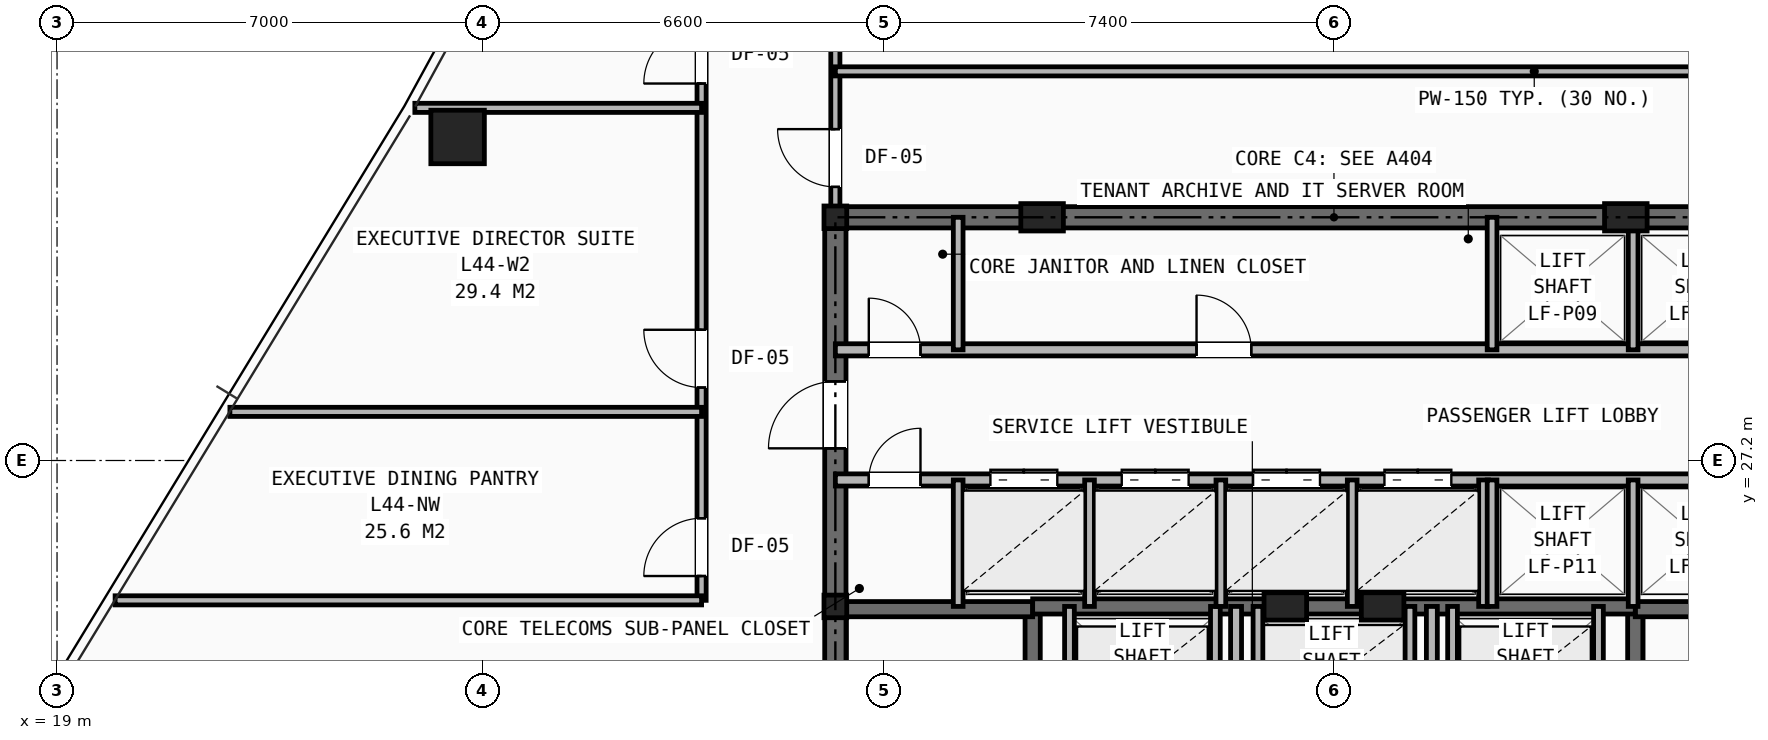
"""IFC4 building model, lengths in metres.
Left out: names, types, materials, properties, quantities, classifications, styles, units other than length and angle.
Written with IfcOpenShell. Run it as: python <this file> out.ifc"""

import sys

from ifc_helpers import new_model, si_unit, direction, frame, frame_2d, origin, origin_2d, place, context, subcontext, project, spatial, rectangle, hollow_rectangle, i_section, extrude, element, fill, save


model = new_model("IFC4")
c1 = context("Model", 3, precision=1e-05, world=origin(), true_north=direction((0.0, 1.0)))
c2 = subcontext(c1, "Body", "Model", "MODEL_VIEW")
j1 = project(units=[si_unit("LENGTHUNIT", "METRE"), si_unit("PLANEANGLEUNIT", "RADIAN")], contexts=[c1])
p1 = place(None, origin())
s1 = spatial("IfcSite", under=j1, at=p1, CompositionType="ELEMENT")
p2 = place(p1, origin())
s2 = spatial("IfcBuilding", under=s1, at=p2, CompositionType="ELEMENT")
p3 = place(p2, frame((0.0, 0.0, 153.95)))
s3 = spatial("IfcBuildingStorey", under=s2, at=p3, CompositionType="ELEMENT", Elevation=153.95)
for number, where, z_axis, x_axis in (
    (1, (31.8, 24.8, 0.0), (0.0, 0.0, 1.0), (1.0, 0.0, 0.0)),
    (2, (31.8, 31.2, 0.0), (0.0, 0.0, 1.0), (1.0, 0.0, 0.0)),
):
    element("IfcColumn", number, at=place(p3, frame(where, z_axis=z_axis, x_axis=x_axis)), inside=s3, PredefinedType="COLUMN", context=c2, shape_type="SweptSolid", body=[
        extrude(i_section(OverallWidth=0.374, OverallDepth=0.372, WebThickness=0.016, FlangeThickness=0.026, at=origin_2d()), origin(), (0.0, 0.0, 1.0), 3.45),
    ])
for number, where, z_axis, x_axis in (
    (3, (35.2, 31.2, 0.0), (0.0, 0.0, 1.0), (1.0, 0.0, 0.0)),
    (4, (44.8, 31.2, 0.0), (0.0, 0.0, 1.0), (1.0, 0.0, 0.0)),
    (5, (39.2, 24.8, 0.0), (0.0, 0.0, 1.0), (1.0, 0.0, 0.0)),
    (6, (40.8, 24.8, 0.0), (0.0, 0.0, 1.0), (1.0, 0.0, 0.0)),
):
    element("IfcColumn", number, at=place(p3, frame(where, z_axis=z_axis, x_axis=x_axis)), inside=s3, PredefinedType="PILASTER", context=c2, shape_type="SweptSolid", body=[
        extrude(rectangle(XDim=0.7, YDim=0.45, at=origin_2d()), origin(), (0.0, 0.0, 1.0), 3.45),
    ])
p4 = place(p3, frame((25.588, 32.521, 0.0), z_axis=(0.0, 0.0, 1.0), x_axis=(1.0, 0.0, 0.0)))
e7 = element("IfcColumn", 7, at=p4, inside=s3, PredefinedType="COLUMN", context=c2, shape_type="SweptSolid", body=[
    extrude(hollow_rectangle(XDim=0.88, YDim=0.88, WallThickness=0.06, at=origin_2d()), origin(), (0.0, 0.0, 1.0), 3.45),
])
p5 = place(p3, frame((31.8, 31.2, 0.0), z_axis=(0.0, 0.0, 1.0), x_axis=(1.0, 0.0, 0.0)))
e8 = element("IfcWall", 8, at=p5, inside=s3, PredefinedType="SHEAR", context=c2, shape_type="SweptSolid", body=[
    extrude(rectangle(XDim=16.4, YDim=0.35, at=frame_2d((8.2, 0.0))), origin(), (0.0, 0.0, 1.0), 3.15),
])
p6 = place(p3, frame((31.8, 16.4, 0.0), z_axis=(0.0, 0.0, 1.0), x_axis=(0.0, 1.0, 0.0)))
e9 = element("IfcWall", 9, at=p6, inside=s3, PredefinedType="SHEAR", context=c2, shape_type="SweptSolid", body=[
    extrude(rectangle(XDim=14.8, YDim=0.35, at=frame_2d((7.4, 0.0))), origin(), (0.0, 0.0, 1.0), 3.15),
])
p7 = place(p6, frame((11.0, 0.0, 0.0)))
e10 = element("IfcOpeningElement", 10, at=p7, cuts=e9, PredefinedType="OPENING", context=c2, shape_type="SweptSolid", body=[
    extrude(rectangle(XDim=1.1, YDim=2.15, at=frame_2d((0.55, 1.075))), frame((0.0, 0.185, 0.0), z_axis=(0.0, -1.0, 0.0), x_axis=(1.0, 0.0, 0.0)), (0.0, 0.0, 1.0), 0.37),
])
p8 = place(p3, frame((35.045, 16.4, 0.0), z_axis=(0.0, 0.0, 1.0), x_axis=(0.0, 1.0, 0.0)))
e11 = element("IfcWall", 11, at=p8, inside=s3, PredefinedType="SHEAR", context=c2, shape_type="SweptSolid", body=[
    extrude(rectangle(XDim=8.4, YDim=0.25, at=frame_2d((4.2, 0.0))), origin(), (0.0, 0.0, 1.0), 3.15),
])
p9 = place(p8, frame((0.45, 0.0, 0.0)))
e12 = element("IfcOpeningElement", 12, at=p9, cuts=e11, PredefinedType="OPENING", context=c2, shape_type="SweptSolid", body=[
    extrude(rectangle(XDim=0.95, YDim=2.1, at=frame_2d((0.475, 1.05))), frame((0.0, 0.135, 0.0), z_axis=(0.0, -1.0, 0.0), x_axis=(1.0, 0.0, 0.0)), (0.0, 0.0, 1.0), 0.27),
])
p10 = place(p3, frame((31.8, 24.755, 0.0), z_axis=(0.0, 0.0, 1.0), x_axis=(1.0, 0.0, 0.0)))
e13 = element("IfcWall", 13, at=p10, inside=s3, PredefinedType="SHEAR", context=c2, shape_type="SweptSolid", body=[
    extrude(rectangle(XDim=3.245, YDim=0.25, at=frame_2d((1.623, 0.0))), origin(), (0.0, 0.0, 1.0), 3.15),
])
p11 = place(p3, frame((44.955, 16.4, 0.0), z_axis=(0.0, 0.0, 1.0), x_axis=(0.0, 1.0, 0.0)))
e14 = element("IfcWall", 14, at=p11, inside=s3, PredefinedType="SHEAR", context=c2, shape_type="SweptSolid", body=[
    extrude(rectangle(XDim=8.4, YDim=0.25, at=frame_2d((4.2, 0.0))), origin(), (0.0, 0.0, 1.0), 3.15),
])
p12 = place(p11, frame((0.45, 0.0, 0.0)))
e15 = element("IfcOpeningElement", 15, at=p12, cuts=e14, PredefinedType="OPENING", context=c2, shape_type="SweptSolid", body=[
    extrude(rectangle(XDim=0.95, YDim=2.1, at=frame_2d((0.475, 1.05))), frame((0.0, 0.135, 0.0), z_axis=(0.0, -1.0, 0.0), x_axis=(1.0, 0.0, 0.0)), (0.0, 0.0, 1.0), 0.27),
])
p13 = place(p3, frame((44.955, 24.755, 0.0), z_axis=(0.0, 0.0, 1.0), x_axis=(1.0, 0.0, 0.0)))
e16 = element("IfcWall", 16, at=p13, inside=s3, PredefinedType="SHEAR", context=c2, shape_type="SweptSolid", body=[
    extrude(rectangle(XDim=3.245, YDim=0.25, at=frame_2d((1.623, 0.0))), origin(), (0.0, 0.0, 1.0), 3.15),
])
p14 = place(p3, frame((35.045, 24.8, 0.0), z_axis=(0.0, 0.0, 1.0), x_axis=(1.0, 0.0, 0.0)))
e17 = element("IfcWall", 17, at=p14, inside=s3, PredefinedType="SHEAR", context=c2, shape_type="SweptSolid", body=[
    extrude(rectangle(XDim=9.91, YDim=0.25, at=frame_2d((4.955, 0.0))), origin(), (0.0, 0.0, 1.0), 3.15),
])
p15 = place(p3, frame((38.39, 16.4, 0.0), z_axis=(0.0, 0.0, 1.0), x_axis=(0.0, 1.0, 0.0)))
e18 = element("IfcWall", 18, at=p15, inside=s3, PredefinedType="PARTITIONING", context=c2, shape_type="SweptSolid", body=[
    extrude(rectangle(XDim=8.4, YDim=0.18, at=frame_2d((4.2, 0.0))), origin(), (0.0, 0.0, 1.0), 2.601),
])
p16 = place(p15, frame((4.45, 0.0, 0.0)))
e19 = element("IfcOpeningElement", 19, at=p16, cuts=e18, PredefinedType="OPENING", context=c2, shape_type="SweptSolid", body=[
    extrude(rectangle(XDim=0.95, YDim=2.1, at=frame_2d((0.475, 1.05))), frame((0.0, 0.1, 0.0), z_axis=(0.0, -1.0, 0.0), x_axis=(1.0, 0.0, 0.0)), (0.0, 0.0, 1.0), 0.2),
])
p17 = place(p3, frame((41.61, 16.4, 0.0), z_axis=(0.0, 0.0, 1.0), x_axis=(0.0, 1.0, 0.0)))
e20 = element("IfcWall", 20, at=p17, inside=s3, PredefinedType="PARTITIONING", context=c2, shape_type="SweptSolid", body=[
    extrude(rectangle(XDim=8.4, YDim=0.18, at=frame_2d((4.2, 0.0))), origin(), (0.0, 0.0, 1.0), 2.601),
])
p18 = place(p17, frame((2.5, 0.0, 0.0)))
e21 = element("IfcOpeningElement", 21, at=p18, cuts=e20, PredefinedType="OPENING", context=c2, shape_type="SweptSolid", body=[
    extrude(rectangle(XDim=0.85, YDim=2.05, at=frame_2d((0.425, 1.025))), frame((0.0, 0.1, 0.0), z_axis=(0.0, -1.0, 0.0), x_axis=(1.0, 0.0, 0.0)), (0.0, 0.0, 1.0), 0.2),
])
for number, where, z_axis, x_axis in (
    (22, (35.65, 22.48, 0.0), (0.0, 0.0, 1.0), (0.0, 1.0, 0.0)),
    (23, (38.05, 22.48, 0.0), (0.0, 0.0, 1.0), (0.0, 1.0, 0.0)),
    (24, (41.95, 22.48, 0.0), (0.0, 0.0, 1.0), (0.0, 1.0, 0.0)),
    (25, (44.35, 22.48, 0.0), (0.0, 0.0, 1.0), (0.0, 1.0, 0.0)),
    (26, (38.75, 22.48, 0.0), (0.0, 0.0, 1.0), (0.0, 1.0, 0.0)),
    (27, (41.25, 22.48, 0.0), (0.0, 0.0, 1.0), (0.0, 1.0, 0.0)),
):
    element("IfcWall", number, at=place(p3, frame(where, z_axis=z_axis, x_axis=x_axis)), inside=s3, PredefinedType="SOLIDWALL", context=c2, shape_type="SweptSolid", body=[
        extrude(rectangle(XDim=2.32, YDim=0.16, at=frame_2d((1.16, 0.0))), origin(), (0.0, 0.0, 1.0), 3.15),
    ])
p19 = place(p3, frame((31.8, 29.02, 0.0), z_axis=(0.0, 0.0, 1.0), x_axis=(1.0, 0.0, 0.0)))
e28 = element("IfcWall", 28, at=p19, inside=s3, PredefinedType="SOLIDWALL", context=c2, shape_type="SweptSolid", body=[
    extrude(rectangle(XDim=16.4, YDim=0.2, at=frame_2d((8.2, 0.0))), origin(), (0.0, 0.0, 1.0), 2.601),
])
p20 = place(p19, frame((0.55, 0.0, 0.0)))
e29 = element("IfcOpeningElement", 29, at=p20, cuts=e28, PredefinedType="OPENING", context=c2, shape_type="SweptSolid", body=[
    extrude(rectangle(XDim=0.85, YDim=2.05, at=frame_2d((0.425, 1.025))), frame((0.0, 0.11, 0.0), z_axis=(0.0, -1.0, 0.0), x_axis=(1.0, 0.0, 0.0)), (0.0, 0.0, 1.0), 0.22),
])
p21 = place(p19, frame((5.94, 0.0, 0.0)))
e30 = element("IfcOpeningElement", 30, at=p21, cuts=e28, PredefinedType="OPENING", context=c2, shape_type="SweptSolid", body=[
    extrude(rectangle(XDim=0.9, YDim=2.1, at=frame_2d((0.45, 1.05))), frame((0.0, 0.11, 0.0), z_axis=(0.0, -1.0, 0.0), x_axis=(1.0, 0.0, 0.0)), (0.0, 0.0, 1.0), 0.22),
])
p22 = place(p3, frame((31.8, 26.88, 0.0), z_axis=(0.0, 0.0, 1.0), x_axis=(1.0, 0.0, 0.0)))
e31 = element("IfcWall", 31, at=p22, inside=s3, PredefinedType="SOLIDWALL", context=c2, shape_type="SweptSolid", body=[
    extrude(rectangle(XDim=16.4, YDim=0.2, at=frame_2d((8.2, 0.0))), origin(), (0.0, 0.0, 1.0), 2.601),
])
p23 = place(p22, frame((0.55, 0.0, 0.0)))
e32 = element("IfcOpeningElement", 32, at=p23, cuts=e31, PredefinedType="OPENING", context=c2, shape_type="SweptSolid", body=[
    extrude(rectangle(XDim=0.85, YDim=2.05, at=frame_2d((0.425, 1.025))), frame((0.0, 0.11, 0.0), z_axis=(0.0, -1.0, 0.0), x_axis=(1.0, 0.0, 0.0)), (0.0, 0.0, 1.0), 0.22),
])
p24 = place(p22, frame((2.55, 0.0, 0.0)))
e33 = element("IfcOpeningElement", 33, at=p24, cuts=e31, PredefinedType="OPENING", context=c2, shape_type="SweptSolid", body=[
    extrude(rectangle(XDim=1.1, YDim=2.15, at=frame_2d((0.55, 1.075))), frame((0.0, 0.11, 0.0), z_axis=(0.0, -1.0, 0.0), x_axis=(1.0, 0.0, 0.0)), (0.0, 0.0, 1.0), 0.22),
])
p25 = place(p22, frame((4.71, 0.0, 0.0)))
e34 = element("IfcOpeningElement", 34, at=p25, cuts=e31, PredefinedType="OPENING", context=c2, shape_type="SweptSolid", body=[
    extrude(rectangle(XDim=1.1, YDim=2.15, at=frame_2d((0.55, 1.075))), frame((0.0, 0.11, 0.0), z_axis=(0.0, -1.0, 0.0), x_axis=(1.0, 0.0, 0.0)), (0.0, 0.0, 1.0), 0.22),
])
p26 = place(p22, frame((6.87, 0.0, 0.0)))
e35 = element("IfcOpeningElement", 35, at=p26, cuts=e31, PredefinedType="OPENING", context=c2, shape_type="SweptSolid", body=[
    extrude(rectangle(XDim=1.1, YDim=2.15, at=frame_2d((0.55, 1.075))), frame((0.0, 0.11, 0.0), z_axis=(0.0, -1.0, 0.0), x_axis=(1.0, 0.0, 0.0)), (0.0, 0.0, 1.0), 0.22),
])
p27 = place(p22, frame((9.03, 0.0, 0.0)))
e36 = element("IfcOpeningElement", 36, at=p27, cuts=e31, PredefinedType="OPENING", context=c2, shape_type="SweptSolid", body=[
    extrude(rectangle(XDim=1.1, YDim=2.15, at=frame_2d((0.55, 1.075))), frame((0.0, 0.11, 0.0), z_axis=(0.0, -1.0, 0.0), x_axis=(1.0, 0.0, 0.0)), (0.0, 0.0, 1.0), 0.22),
])
p28 = place(p3, frame((33.82, 29.02, 0.0), z_axis=(0.0, 0.0, 1.0), x_axis=(0.0, 1.0, 0.0)))
e37 = element("IfcWall", 37, at=p28, inside=s3, PredefinedType="SOLIDWALL", context=c2, shape_type="SweptSolid", body=[
    extrude(rectangle(XDim=2.18, YDim=0.16, at=frame_2d((1.09, 0.0))), origin(), (0.0, 0.0, 1.0), 2.601),
])
for number, where, z_axis, x_axis in (
    (38, (33.82, 24.8, 0.0), (0.0, 0.0, 1.0), (0.0, 1.0, 0.0)),
    (39, (35.98, 24.8, 0.0), (0.0, 0.0, 1.0), (0.0, 1.0, 0.0)),
    (40, (38.14, 24.8, 0.0), (0.0, 0.0, 1.0), (0.0, 1.0, 0.0)),
    (41, (40.3, 24.8, 0.0), (0.0, 0.0, 1.0), (0.0, 1.0, 0.0)),
    (42, (42.46, 24.8, 0.0), (0.0, 0.0, 1.0), (0.0, 1.0, 0.0)),
):
    element("IfcWall", number, at=place(p3, frame(where, z_axis=z_axis, x_axis=x_axis)), inside=s3, PredefinedType="SOLIDWALL", context=c2, shape_type="SweptSolid", body=[
        extrude(rectangle(XDim=2.08, YDim=0.16, at=frame_2d((1.04, 0.0))), origin(), (0.0, 0.0, 1.0), 3.15),
    ])
for number, where, z_axis, x_axis in (
    (43, (42.6, 29.02, 0.0), (0.0, 0.0, 1.0), (0.0, 1.0, 0.0)),
    (44, (44.92, 29.02, 0.0), (0.0, 0.0, 1.0), (0.0, 1.0, 0.0)),
):
    element("IfcWall", number, at=place(p3, frame(where, z_axis=z_axis, x_axis=x_axis)), inside=s3, PredefinedType="SOLIDWALL", context=c2, shape_type="SweptSolid", body=[
        extrude(rectangle(XDim=2.18, YDim=0.16, at=frame_2d((1.09, 0.0))), origin(), (0.0, 0.0, 1.0), 2.601),
    ])
for number, where, z_axis, x_axis in (
    (45, (42.6, 24.8, 0.0), (0.0, 0.0, 1.0), (0.0, 1.0, 0.0)),
    (46, (44.92, 24.8, 0.0), (0.0, 0.0, 1.0), (0.0, 1.0, 0.0)),
):
    element("IfcWall", number, at=place(p3, frame(where, z_axis=z_axis, x_axis=x_axis)), inside=s3, PredefinedType="SOLIDWALL", context=c2, shape_type="SweptSolid", body=[
        extrude(rectangle(XDim=2.08, YDim=0.16, at=frame_2d((1.04, 0.0))), origin(), (0.0, 0.0, 1.0), 3.15),
    ])
p29 = place(p3, frame((29.6, 24.9, 0.0), z_axis=(0.0, 0.0, 1.0), x_axis=(0.0, 1.0, 0.0)))
e47 = element("IfcWall", 47, at=p29, inside=s3, PredefinedType="PARTITIONING", context=c2, shape_type="SweptSolid", body=[
    extrude(rectangle(XDim=13.9, YDim=0.15, at=frame_2d((6.95, 0.0))), origin(), (0.0, 0.0, 1.0), 2.165),
])
p30 = place(p29, frame((0.4, 0.0, 0.0)))
e48 = element("IfcOpeningElement", 48, at=p30, cuts=e47, PredefinedType="OPENING", context=c2, shape_type="SweptSolid", body=[
    extrude(rectangle(XDim=0.95, YDim=2.1, at=frame_2d((0.475, 1.05))), frame((0.0, 0.085, 0.0), z_axis=(0.0, -1.0, 0.0), x_axis=(1.0, 0.0, 0.0)), (0.0, 0.0, 1.0), 0.17),
])
p31 = place(p29, frame((3.5, 0.0, 0.0)))
e49 = element("IfcOpeningElement", 49, at=p31, cuts=e47, PredefinedType="OPENING", context=c2, shape_type="SweptSolid", body=[
    extrude(rectangle(XDim=0.95, YDim=2.1, at=frame_2d((0.475, 1.05))), frame((0.0, 0.085, 0.0), z_axis=(0.0, -1.0, 0.0), x_axis=(1.0, 0.0, 0.0)), (0.0, 0.0, 1.0), 0.17),
])
p32 = place(p29, frame((8.5, 0.0, 0.0)))
e50 = element("IfcOpeningElement", 50, at=p32, cuts=e47, PredefinedType="OPENING", context=c2, shape_type="SweptSolid", body=[
    extrude(rectangle(XDim=0.95, YDim=2.1, at=frame_2d((0.475, 1.05))), frame((0.0, 0.085, 0.0), z_axis=(0.0, -1.0, 0.0), x_axis=(1.0, 0.0, 0.0)), (0.0, 0.0, 1.0), 0.17),
])
p33 = place(p3, frame((31.8, 31.2, 0.0), z_axis=(0.0, 0.0, 1.0), x_axis=(0.0, 1.0, 0.0)))
e51 = element("IfcWall", 51, at=p33, inside=s3, PredefinedType="PARTITIONING", context=c2, shape_type="SweptSolid", body=[
    extrude(rectangle(XDim=5.3, YDim=0.15, at=frame_2d((2.65, 0.0))), origin(), (0.0, 0.0, 1.0), 2.165),
])
p34 = place(p33, frame((0.5, 0.0, 0.0)))
e52 = element("IfcOpeningElement", 52, at=p34, cuts=e51, PredefinedType="OPENING", context=c2, shape_type="SweptSolid", body=[
    extrude(rectangle(XDim=0.95, YDim=2.1, at=frame_2d((0.475, 1.05))), frame((0.0, 0.085, 0.0), z_axis=(0.0, -1.0, 0.0), x_axis=(1.0, 0.0, 0.0)), (0.0, 0.0, 1.0), 0.17),
])
p35 = place(p33, frame((2.9, 0.0, 0.0)))
e53 = element("IfcOpeningElement", 53, at=p35, cuts=e51, PredefinedType="OPENING", context=c2, shape_type="SweptSolid", body=[
    extrude(rectangle(XDim=0.95, YDim=2.1, at=frame_2d((0.475, 1.05))), frame((0.0, 0.085, 0.0), z_axis=(0.0, -1.0, 0.0), x_axis=(1.0, 0.0, 0.0)), (0.0, 0.0, 1.0), 0.17),
])
p36 = place(p3, frame((19.955, 24.9, 0.0), z_axis=(0.0, 0.0, 1.0), x_axis=(1.0, 0.0, 0.0)))
e54 = element("IfcWall", 54, at=p36, inside=s3, PredefinedType="PARTITIONING", context=c2, shape_type="SweptSolid", body=[
    extrude(rectangle(XDim=9.645, YDim=0.15, at=frame_2d((4.823, 0.0))), origin(), (0.0, 0.0, 1.0), 2.529),
])
p37 = place(p3, frame((21.843, 28.0, 0.0), z_axis=(0.0, 0.0, 1.0), x_axis=(1.0, 0.0, 0.0)))
e55 = element("IfcWall", 55, at=p37, inside=s3, PredefinedType="PARTITIONING", context=c2, shape_type="SweptSolid", body=[
    extrude(rectangle(XDim=7.757, YDim=0.15, at=frame_2d((3.878, 0.0))), origin(), (0.0, 0.0, 1.0), 2.529),
])
p38 = place(p3, frame((24.885, 33.0, 0.0), z_axis=(0.0, 0.0, 1.0), x_axis=(1.0, 0.0, 0.0)))
e56 = element("IfcWall", 56, at=p38, inside=s3, PredefinedType="PARTITIONING", context=c2, shape_type="SweptSolid", body=[
    extrude(rectangle(XDim=4.716, YDim=0.15, at=frame_2d((2.358, 0.0))), origin(), (0.0, 0.0, 1.0), 2.529),
])
p39 = place(p3, frame((31.8, 33.6, 0.0), z_axis=(0.0, 0.0, 1.0), x_axis=(1.0, 0.0, 0.0)))
e57 = element("IfcWall", 57, at=p39, inside=s3, PredefinedType="PARTITIONING", context=c2, shape_type="SweptSolid", body=[
    extrude(rectangle(XDim=22.988, YDim=0.15, at=frame_2d((11.494, 0.0))), origin(), (0.0, 0.0, 1.0), 2.529),
])
p40 = place(p20, origin())
e58 = element("IfcDoor", 58, at=p40, inside=s3, OperationType="SINGLE_SWING_LEFT", PredefinedType="DOOR", context=c2, shape_type="SweptSolid", body=[
    extrude(rectangle(XDim=0.85, YDim=2.05, at=frame_2d((0.425, 1.025))), frame((0.0, 0.025, 0.0), z_axis=(0.0, -1.0, 0.0), x_axis=(1.0, 0.0, 0.0)), (0.0, 0.0, 1.0), 0.05),
])
fill(e29, e58)
p41 = place(p23, origin())
e59 = element("IfcDoor", 59, at=p41, inside=s3, OperationType="SINGLE_SWING_RIGHT", PredefinedType="DOOR", context=c2, shape_type="SweptSolid", body=[
    extrude(rectangle(XDim=0.85, YDim=2.05, at=frame_2d((0.425, 1.025))), frame((0.0, 0.025, 0.0), z_axis=(0.0, -1.0, 0.0), x_axis=(1.0, 0.0, 0.0)), (0.0, 0.0, 1.0), 0.05),
])
fill(e32, e59)
p42 = place(p7, origin())
e60 = element("IfcDoor", 60, at=p42, inside=s3, OperationType="SINGLE_SWING_LEFT", PredefinedType="DOOR", context=c2, shape_type="SweptSolid", body=[
    extrude(rectangle(XDim=1.1, YDim=2.15, at=frame_2d((0.55, 1.075))), frame((0.0, 0.025, 0.0), z_axis=(0.0, -1.0, 0.0), x_axis=(1.0, 0.0, 0.0)), (0.0, 0.0, 1.0), 0.05),
])
fill(e10, e60)
p43 = place(p21, origin())
e61 = element("IfcDoor", 61, at=p43, inside=s3, OperationType="SINGLE_SWING_LEFT", PredefinedType="DOOR", context=c2, shape_type="SweptSolid", body=[
    extrude(rectangle(XDim=0.9, YDim=2.1, at=frame_2d((0.45, 1.05))), frame((0.0, 0.025, 0.0), z_axis=(0.0, -1.0, 0.0), x_axis=(1.0, 0.0, 0.0)), (0.0, 0.0, 1.0), 0.05),
])
fill(e30, e61)
p44 = place(p24, origin())
e62 = element("IfcDoor", 62, at=p44, inside=s3, OperationType="DOUBLE_DOOR_SLIDING", PredefinedType="DOOR", context=c2, shape_type="SweptSolid", body=[
    extrude(rectangle(XDim=1.1, YDim=2.15, at=frame_2d((0.55, 1.075))), frame((0.0, 0.025, 0.0), z_axis=(0.0, -1.0, 0.0), x_axis=(1.0, 0.0, 0.0)), (0.0, 0.0, 1.0), 0.05),
])
fill(e33, e62)
p45 = place(p25, origin())
e63 = element("IfcDoor", 63, at=p45, inside=s3, OperationType="DOUBLE_DOOR_SLIDING", PredefinedType="DOOR", context=c2, shape_type="SweptSolid", body=[
    extrude(rectangle(XDim=1.1, YDim=2.15, at=frame_2d((0.55, 1.075))), frame((0.0, 0.025, 0.0), z_axis=(0.0, -1.0, 0.0), x_axis=(1.0, 0.0, 0.0)), (0.0, 0.0, 1.0), 0.05),
])
fill(e34, e63)
p46 = place(p26, origin())
e64 = element("IfcDoor", 64, at=p46, inside=s3, OperationType="DOUBLE_DOOR_SLIDING", PredefinedType="DOOR", context=c2, shape_type="SweptSolid", body=[
    extrude(rectangle(XDim=1.1, YDim=2.15, at=frame_2d((0.55, 1.075))), frame((0.0, 0.025, 0.0), z_axis=(0.0, -1.0, 0.0), x_axis=(1.0, 0.0, 0.0)), (0.0, 0.0, 1.0), 0.05),
])
fill(e35, e64)
p47 = place(p27, origin())
e65 = element("IfcDoor", 65, at=p47, inside=s3, OperationType="DOUBLE_DOOR_SLIDING", PredefinedType="DOOR", context=c2, shape_type="SweptSolid", body=[
    extrude(rectangle(XDim=1.1, YDim=2.15, at=frame_2d((0.55, 1.075))), frame((0.0, 0.025, 0.0), z_axis=(0.0, -1.0, 0.0), x_axis=(1.0, 0.0, 0.0)), (0.0, 0.0, 1.0), 0.05),
])
fill(e36, e65)
p48 = place(p30, origin())
e66 = element("IfcDoor", 66, at=p48, inside=s3, OperationType="SINGLE_SWING_LEFT", PredefinedType="DOOR", context=c2, shape_type="SweptSolid", body=[
    extrude(rectangle(XDim=0.95, YDim=2.1, at=frame_2d((0.475, 1.05))), frame((0.0, 0.025, 0.0), z_axis=(0.0, -1.0, 0.0), x_axis=(1.0, 0.0, 0.0)), (0.0, 0.0, 1.0), 0.05),
])
fill(e48, e66)
p49 = place(p31, origin())
e67 = element("IfcDoor", 67, at=p49, inside=s3, OperationType="SINGLE_SWING_RIGHT", PredefinedType="DOOR", context=c2, shape_type="SweptSolid", body=[
    extrude(rectangle(XDim=0.95, YDim=2.1, at=frame_2d((0.475, 1.05))), frame((0.0, 0.025, 0.0), z_axis=(0.0, -1.0, 0.0), x_axis=(1.0, 0.0, 0.0)), (0.0, 0.0, 1.0), 0.05),
])
fill(e49, e67)
p50 = place(p32, origin())
e68 = element("IfcDoor", 68, at=p50, inside=s3, OperationType="SINGLE_SWING_LEFT", PredefinedType="DOOR", context=c2, shape_type="SweptSolid", body=[
    extrude(rectangle(XDim=0.95, YDim=2.1, at=frame_2d((0.475, 1.05))), frame((0.0, 0.025, 0.0), z_axis=(0.0, -1.0, 0.0), x_axis=(1.0, 0.0, 0.0)), (0.0, 0.0, 1.0), 0.05),
])
fill(e50, e68)
p51 = place(p34, origin())
e69 = element("IfcDoor", 69, at=p51, inside=s3, OperationType="SINGLE_SWING_RIGHT", PredefinedType="DOOR", context=c2, shape_type="SweptSolid", body=[
    extrude(rectangle(XDim=0.95, YDim=2.1, at=frame_2d((0.475, 1.05))), frame((0.0, 0.025, 0.0), z_axis=(0.0, -1.0, 0.0), x_axis=(1.0, 0.0, 0.0)), (0.0, 0.0, 1.0), 0.05),
])
fill(e52, e69)
save(model, sys.argv[1])
